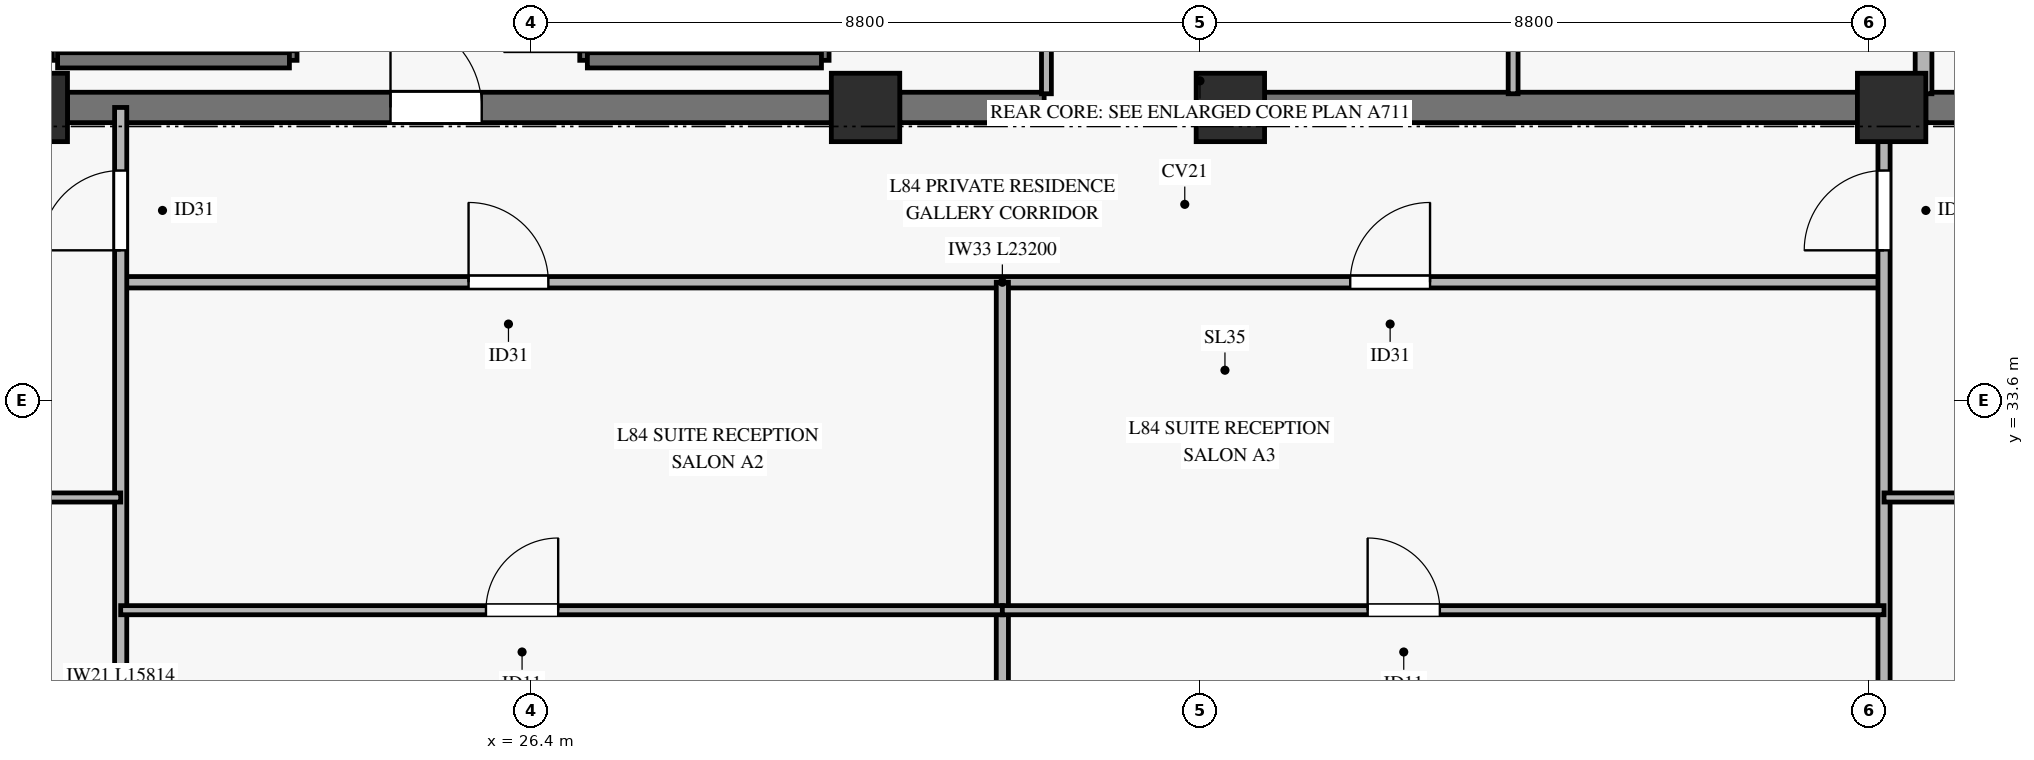
"""IFC4 building model, lengths in metres.
Left out: names, types, materials, properties, quantities, classifications, styles, units other than length and angle.
Written with IfcOpenShell. Run it as: python <this file> out.ifc"""

import sys

from ifc_helpers import new_model, si_unit, direction, frame, frame_2d, origin, origin_2d, place, context, subcontext, project, spatial, rectangle, extrude, source, transform, mapped, element, fill, save


model = new_model("IFC4")
c1 = context("Model", 3, precision=1e-05, world=origin(), true_north=direction((0.0, 1.0)))
c2 = subcontext(c1, "Body", "Model", "MODEL_VIEW")
j1 = project(units=[si_unit("LENGTHUNIT", "METRE"), si_unit("PLANEANGLEUNIT", "RADIAN")], contexts=[c1])
p1 = place(None, origin())
s1 = spatial("IfcSite", under=j1, at=p1, CompositionType="ELEMENT")
p2 = place(p1, origin())
s2 = spatial("IfcBuilding", under=s1, at=p2, CompositionType="ELEMENT")
p3 = place(p2, frame((0.0, 0.0, 324.4)))
s3 = spatial("IfcBuildingStorey", under=s2, at=p3, CompositionType="ELEMENT", Elevation=324.4)
m1 = source(origin(), c2, "Body", "SweptSolid", [
    extrude(rectangle(XDim=0.9, YDim=0.9, at=origin_2d()), origin(), (0.0, 0.0, 1.0), 3.12),
])
for number, where, z_axis, x_axis in (
    (1, (19.85, 37.45, 0.0), (0.0, 0.0, 1.0), (1.0, 0.0, 0.0)),
    (2, (30.8, 37.45, 0.0), (0.0, 0.0, 1.0), (1.0, 0.0, 0.0)),
    (3, (35.6, 37.45, 0.0), (0.0, 0.0, 1.0), (1.0, 0.0, 0.0)),
    (4, (44.3, 37.45, 0.0), (0.0, 0.0, 1.0), (1.0, 0.0, 0.0)),
):
    element("IfcColumn", number, at=place(p3, frame(where, z_axis=z_axis, x_axis=x_axis)), inside=s3, PredefinedType="PILASTER", context=c2, shape_type="MappedRepresentation", body=[
        mapped(m1, transform((0.0, 0.0, 0.0), x_axis=(1.0, 0.0, 0.0), y_axis=(0.0, 1.0, 0.0), z_axis=(0.0, 0.0, 1.0), scale=1.0)),
    ])
p4 = place(p3, frame((20.3, 37.45, 0.0), z_axis=(0.0, 0.0, 1.0), x_axis=(1.0, 0.0, 0.0)))
e5 = element("IfcWall", 5, at=p4, inside=s3, PredefinedType="SHEAR", context=c2, shape_type="SweptSolid", body=[
    extrude(rectangle(XDim=10.05, YDim=0.4, at=frame_2d((5.025, 0.0))), origin(), (0.0, 0.0, 1.0), 3.12),
])
p5 = place(p4, frame((4.25, 0.0, 0.0)))
e6 = element("IfcOpeningElement", 6, at=p5, cuts=e5, PredefinedType="OPENING", context=c2, shape_type="SweptSolid", body=[
    extrude(rectangle(XDim=1.2, YDim=2.15, at=frame_2d((0.6, 1.075))), frame((0.0, 0.21, 0.0), z_axis=(0.0, -1.0, 0.0), x_axis=(1.0, 0.0, 0.0)), (0.0, 0.0, 1.0), 0.42),
])
p6 = place(p3, frame((31.25, 37.45, 0.0), z_axis=(0.0, 0.0, 1.0), x_axis=(1.0, 0.0, 0.0)))
e7 = element("IfcWall", 7, at=p6, inside=s3, PredefinedType="SHEAR", context=c2, shape_type="SweptSolid", body=[
    extrude(rectangle(XDim=1.9, YDim=0.4, at=frame_2d((0.95, 0.0))), origin(), (0.0, 0.0, 1.0), 3.12),
])
p7 = place(p3, frame((36.05, 37.45, 0.0), z_axis=(0.0, 0.0, 1.0), x_axis=(1.0, 0.0, 0.0)))
e8 = element("IfcWall", 8, at=p7, inside=s3, PredefinedType="SHEAR", context=c2, shape_type="SweptSolid", body=[
    extrude(rectangle(XDim=7.8, YDim=0.4, at=frame_2d((3.9, 0.0))), origin(), (0.0, 0.0, 1.0), 3.12),
])
p8 = place(p3, frame((44.75, 37.45, 0.0), z_axis=(0.0, 0.0, 1.0), x_axis=(1.0, 0.0, 0.0)))
e9 = element("IfcWall", 9, at=p8, inside=s3, PredefinedType="SHEAR", context=c2, shape_type="SweptSolid", body=[
    extrude(rectangle(XDim=5.35, YDim=0.4, at=frame_2d((2.675, 0.0))), origin(), (0.0, 0.0, 1.0), 3.12),
])
p9 = place(p8, frame((0.7, 0.0, 0.0)))
e10 = element("IfcOpeningElement", 10, at=p9, cuts=e9, PredefinedType="OPENING", context=c2, shape_type="SweptSolid", body=[
    extrude(rectangle(XDim=1.2, YDim=2.15, at=frame_2d((0.6, 1.075))), frame((0.0, 0.21, 0.0), z_axis=(0.0, -1.0, 0.0), x_axis=(1.0, 0.0, 0.0)), (0.0, 0.0, 1.0), 0.42),
])
p10 = place(p3, frame((20.17, 38.07, 0.0), z_axis=(0.0, 0.0, 1.0), x_axis=(0.0, 1.0, 0.0)))
e11 = element("IfcWall", 11, at=p10, inside=s3, PredefinedType="SOLIDWALL", context=c2, shape_type="SweptSolid", body=[
    extrude(rectangle(XDim=7.25, YDim=0.14, at=frame_2d((3.625, 0.0))), origin(), (0.0, 0.0, 1.0), 3.4),
])
p11 = place(p3, frame((23.22, 38.07, 0.0), z_axis=(0.0, 0.0, 1.0), x_axis=(0.0, 1.0, 0.0)))
e12 = element("IfcWall", 12, at=p11, inside=s3, PredefinedType="SOLIDWALL", context=c2, shape_type="SweptSolid", body=[
    extrude(rectangle(XDim=7.25, YDim=0.2, at=frame_2d((3.625, 0.0))), origin(), (0.0, 0.0, 1.0), 3.4),
])
p12 = place(p11, frame((0.11, 0.0, 0.0)))
e13 = element("IfcOpeningElement", 13, at=p12, cuts=e12, PredefinedType="OPENING", context=c2, shape_type="SweptSolid", body=[
    extrude(rectangle(XDim=1.1, YDim=2.15, at=frame_2d((0.55, 1.075))), frame((0.0, 0.11, 0.0), z_axis=(0.0, -1.0, 0.0), x_axis=(1.0, 0.0, 0.0)), (0.0, 0.0, 1.0), 0.22),
])
p13 = place(p3, frame((20.17, 38.07, 0.0), z_axis=(0.0, 0.0, 1.0), x_axis=(1.0, 0.0, 0.0)))
e14 = element("IfcWall", 14, at=p13, inside=s3, PredefinedType="SOLIDWALL", context=c2, shape_type="SweptSolid", body=[
    extrude(rectangle(XDim=3.05, YDim=0.2, at=frame_2d((1.525, 0.0))), origin(), (0.0, 0.0, 1.0), 3.4),
])
p14 = place(p3, frame((27.14, 38.07, 0.0), z_axis=(0.0, 0.0, 1.0), x_axis=(0.0, 1.0, 0.0)))
e15 = element("IfcWall", 15, at=p14, inside=s3, PredefinedType="SOLIDWALL", context=c2, shape_type="SweptSolid", body=[
    extrude(rectangle(XDim=7.25, YDim=0.2, at=frame_2d((3.625, 0.0))), origin(), (0.0, 0.0, 1.0), 3.4),
])
p15 = place(p14, frame((0.11, 0.0, 0.0)))
e16 = element("IfcOpeningElement", 16, at=p15, cuts=e15, PredefinedType="OPENING", context=c2, shape_type="SweptSolid", body=[
    extrude(rectangle(XDim=1.1, YDim=2.15, at=frame_2d((0.55, 1.075))), frame((0.0, 0.11, 0.0), z_axis=(0.0, -1.0, 0.0), x_axis=(1.0, 0.0, 0.0)), (0.0, 0.0, 1.0), 0.22),
])
p16 = place(p3, frame((30.22, 38.07, 0.0), z_axis=(0.0, 0.0, 1.0), x_axis=(0.0, 1.0, 0.0)))
e17 = element("IfcWall", 17, at=p16, inside=s3, PredefinedType="SOLIDWALL", context=c2, shape_type="SweptSolid", body=[
    extrude(rectangle(XDim=7.25, YDim=0.2, at=frame_2d((3.625, 0.0))), origin(), (0.0, 0.0, 1.0), 3.4),
])
p17 = place(p3, frame((27.14, 38.07, 0.0), z_axis=(0.0, 0.0, 1.0), x_axis=(1.0, 0.0, 0.0)))
e18 = element("IfcWall", 18, at=p17, inside=s3, PredefinedType="SOLIDWALL", context=c2, shape_type="SweptSolid", body=[
    extrude(rectangle(XDim=3.08, YDim=0.2, at=frame_2d((1.54, 0.0))), origin(), (0.0, 0.0, 1.0), 3.4),
])
p18 = place(p3, frame((44.72, 37.63, 0.0), z_axis=(0.0, 0.0, 1.0), x_axis=(0.0, 1.0, 0.0)))
e19 = element("IfcWall", 19, at=p18, inside=s3, PredefinedType="SOLIDWALL", context=c2, shape_type="SweptSolid", body=[
    extrude(rectangle(XDim=7.59, YDim=0.22, at=frame_2d((3.795, 0.0))), origin(), (0.0, 0.0, 1.0), 3.12),
])
p19 = place(p3, frame((33.18, 37.63, 0.0), z_axis=(0.0, 0.0, 1.0), x_axis=(0.0, 1.0, 0.0)))
e20 = element("IfcWall", 20, at=p19, inside=s3, PredefinedType="PARTITIONING", context=c2, shape_type="SweptSolid", body=[
    extrude(rectangle(XDim=6.52, YDim=0.13, at=frame_2d((3.26, 0.0))), origin(), (0.0, 0.0, 1.0), 2.22),
])
p20 = place(p19, frame((1.32, 0.0, 0.0)))
e21 = element("IfcOpeningElement", 21, at=p20, cuts=e20, PredefinedType="OPENING", context=c2, shape_type="SweptSolid", body=[
    extrude(rectangle(XDim=0.9, YDim=2.1, at=frame_2d((0.45, 1.05))), frame((0.0, 0.075, 0.0), z_axis=(0.0, -1.0, 0.0), x_axis=(1.0, 0.0, 0.0)), (0.0, 0.0, 1.0), 0.15),
])
p21 = place(p19, frame((4.62, 0.0, 0.0)))
e22 = element("IfcOpeningElement", 22, at=p21, cuts=e20, PredefinedType="OPENING", context=c2, shape_type="SweptSolid", body=[
    extrude(rectangle(XDim=0.9, YDim=2.1, at=frame_2d((0.45, 1.05))), frame((0.0, 0.075, 0.0), z_axis=(0.0, -1.0, 0.0), x_axis=(1.0, 0.0, 0.0)), (0.0, 0.0, 1.0), 0.15),
])
p22 = place(p3, frame((39.32, 37.63, 0.0), z_axis=(0.0, 0.0, 1.0), x_axis=(0.0, 1.0, 0.0)))
e23 = element("IfcWall", 23, at=p22, inside=s3, PredefinedType="PARTITIONING", context=c2, shape_type="SweptSolid", body=[
    extrude(rectangle(XDim=8.74, YDim=0.13, at=frame_2d((4.37, 0.0))), origin(), (0.0, 0.0, 1.0), 3.12),
])
p23 = place(p22, frame((4.89, 0.0, 0.0)))
e24 = element("IfcOpeningElement", 24, at=p23, cuts=e23, PredefinedType="OPENING", context=c2, shape_type="SweptSolid", body=[
    extrude(rectangle(XDim=0.9, YDim=2.1, at=frame_2d((0.45, 1.05))), frame((0.0, 0.075, 0.0), z_axis=(0.0, -1.0, 0.0), x_axis=(1.0, 0.0, 0.0)), (0.0, 0.0, 1.0), 0.15),
])
p24 = place(p3, frame((21.0, 35.15, 0.0), z_axis=(0.0, 0.0, 1.0), x_axis=(1.0, 0.0, 0.0)))
e25 = element("IfcWall", 25, at=p24, inside=s3, PredefinedType="PARTITIONING", context=c2, shape_type="SweptSolid", body=[
    extrude(rectangle(XDim=23.2, YDim=0.15, at=frame_2d((11.6, 0.0))), origin(), (0.0, 0.0, 1.0), 2.405),
])
p25 = place(p24, frame((4.577, 0.0, 0.0)))
e26 = element("IfcOpeningElement", 26, at=p25, cuts=e25, PredefinedType="OPENING", context=c2, shape_type="SweptSolid", body=[
    extrude(rectangle(XDim=1.05, YDim=2.15, at=frame_2d((0.525, 1.075))), frame((0.0, 0.085, 0.0), z_axis=(0.0, -1.0, 0.0), x_axis=(1.0, 0.0, 0.0)), (0.0, 0.0, 1.0), 0.17),
])
p26 = place(p24, frame((16.177, 0.0, 0.0)))
e27 = element("IfcOpeningElement", 27, at=p26, cuts=e25, PredefinedType="OPENING", context=c2, shape_type="SweptSolid", body=[
    extrude(rectangle(XDim=1.05, YDim=2.15, at=frame_2d((0.525, 1.075))), frame((0.0, 0.085, 0.0), z_axis=(0.0, -1.0, 0.0), x_axis=(1.0, 0.0, 0.0)), (0.0, 0.0, 1.0), 0.17),
])
p27 = place(p3, frame((21.0, 21.636, 0.0), z_axis=(0.0, 0.0, 1.0), x_axis=(0.0, 1.0, 0.0)))
e28 = element("IfcWall", 28, at=p27, inside=s3, PredefinedType="PARTITIONING", context=c2, shape_type="SweptSolid", body=[
    extrude(rectangle(XDim=15.814, YDim=0.16, at=frame_2d((7.907, 0.0))), origin(), (0.0, 0.0, 1.0), 2.705),
])
p28 = place(p27, frame((13.934, 0.0, 0.0)))
e29 = element("IfcOpeningElement", 29, at=p28, cuts=e28, PredefinedType="OPENING", context=c2, shape_type="SweptSolid", body=[
    extrude(rectangle(XDim=1.05, YDim=2.15, at=frame_2d((0.525, 1.075))), frame((0.0, 0.09, 0.0), z_axis=(0.0, -1.0, 0.0), x_axis=(1.0, 0.0, 0.0)), (0.0, 0.0, 1.0), 0.18),
])
p29 = place(p3, frame((32.6, 21.636, 0.0), z_axis=(0.0, 0.0, 1.0), x_axis=(0.0, 1.0, 0.0)))
e30 = element("IfcWall", 30, at=p29, inside=s3, PredefinedType="PARTITIONING", context=c2, shape_type="SweptSolid", body=[
    extrude(rectangle(XDim=13.514, YDim=0.16, at=frame_2d((6.757, 0.0))), origin(), (0.0, 0.0, 1.0), 2.705),
])
p30 = place(p3, frame((44.2, 21.636, 0.0), z_axis=(0.0, 0.0, 1.0), x_axis=(0.0, 1.0, 0.0)))
e31 = element("IfcWall", 31, at=p30, inside=s3, PredefinedType="PARTITIONING", context=c2, shape_type="SweptSolid", body=[
    extrude(rectangle(XDim=15.814, YDim=0.16, at=frame_2d((7.907, 0.0))), origin(), (0.0, 0.0, 1.0), 2.405),
])
p31 = place(p30, frame((13.934, 0.0, 0.0)))
e32 = element("IfcOpeningElement", 32, at=p31, cuts=e31, PredefinedType="OPENING", context=c2, shape_type="SweptSolid", body=[
    extrude(rectangle(XDim=1.05, YDim=2.15, at=frame_2d((0.525, 1.075))), frame((0.0, 0.09, 0.0), z_axis=(0.0, -1.0, 0.0), x_axis=(1.0, 0.0, 0.0)), (0.0, 0.0, 1.0), 0.18),
])
p32 = place(p3, frame((11.27, 32.318, 0.0), z_axis=(0.0, 0.0, 1.0), x_axis=(1.0, 0.0, 0.0)))
e33 = element("IfcWall", 33, at=p32, inside=s3, PredefinedType="PARTITIONING", context=c2, shape_type="SweptSolid", body=[
    extrude(rectangle(XDim=9.73, YDim=0.12, at=frame_2d((4.865, 0.0))), origin(), (0.0, 0.0, 1.0), 2.405),
])
p33 = place(p32, frame((4.178, 0.0, 0.0)))
e34 = element("IfcOpeningElement", 34, at=p33, cuts=e33, PredefinedType="OPENING", context=c2, shape_type="SweptSolid", body=[
    extrude(rectangle(XDim=0.95, YDim=2.1, at=frame_2d((0.475, 1.05))), frame((0.0, 0.07, 0.0), z_axis=(0.0, -1.0, 0.0), x_axis=(1.0, 0.0, 0.0)), (0.0, 0.0, 1.0), 0.14),
])
p34 = place(p3, frame((21.0, 30.835, 0.0), z_axis=(0.0, 0.0, 1.0), x_axis=(1.0, 0.0, 0.0)))
e35 = element("IfcWall", 35, at=p34, inside=s3, PredefinedType="PARTITIONING", context=c2, shape_type="SweptSolid", body=[
    extrude(rectangle(XDim=11.6, YDim=0.12, at=frame_2d((5.8, 0.0))), origin(), (0.0, 0.0, 1.0), 2.405),
])
p35 = place(p34, frame((4.806, 0.0, 0.0)))
e36 = element("IfcOpeningElement", 36, at=p35, cuts=e35, PredefinedType="OPENING", context=c2, shape_type="SweptSolid", body=[
    extrude(rectangle(XDim=0.95, YDim=2.1, at=frame_2d((0.475, 1.05))), frame((0.0, 0.07, 0.0), z_axis=(0.0, -1.0, 0.0), x_axis=(1.0, 0.0, 0.0)), (0.0, 0.0, 1.0), 0.14),
])
p36 = place(p3, frame((32.6, 30.835, 0.0), z_axis=(0.0, 0.0, 1.0), x_axis=(1.0, 0.0, 0.0)))
e37 = element("IfcWall", 37, at=p36, inside=s3, PredefinedType="PARTITIONING", context=c2, shape_type="SweptSolid", body=[
    extrude(rectangle(XDim=11.6, YDim=0.12, at=frame_2d((5.8, 0.0))), origin(), (0.0, 0.0, 1.0), 2.405),
])
p37 = place(p36, frame((4.806, 0.0, 0.0)))
e38 = element("IfcOpeningElement", 38, at=p37, cuts=e37, PredefinedType="OPENING", context=c2, shape_type="SweptSolid", body=[
    extrude(rectangle(XDim=0.95, YDim=2.1, at=frame_2d((0.475, 1.05))), frame((0.0, 0.07, 0.0), z_axis=(0.0, -1.0, 0.0), x_axis=(1.0, 0.0, 0.0)), (0.0, 0.0, 1.0), 0.14),
])
p38 = place(p3, frame((44.2, 32.318, 0.0), z_axis=(0.0, 0.0, 1.0), x_axis=(1.0, 0.0, 0.0)))
e39 = element("IfcWall", 39, at=p38, inside=s3, PredefinedType="PARTITIONING", context=c2, shape_type="SweptSolid", body=[
    extrude(rectangle(XDim=14.931, YDim=0.12, at=frame_2d((7.466, 0.0))), origin(), (0.0, 0.0, 1.0), 2.405),
])
p39 = place(p38, frame((6.058, 0.0, 0.0)))
e40 = element("IfcOpeningElement", 40, at=p39, cuts=e39, PredefinedType="OPENING", context=c2, shape_type="SweptSolid", body=[
    extrude(rectangle(XDim=0.95, YDim=2.1, at=frame_2d((0.475, 1.05))), frame((0.0, 0.07, 0.0), z_axis=(0.0, -1.0, 0.0), x_axis=(1.0, 0.0, 0.0)), (0.0, 0.0, 1.0), 0.14),
])
m2 = source(origin(), c2, "Body", "SweptSolid", [
    extrude(rectangle(XDim=1.2, YDim=2.15, at=frame_2d((0.6, 1.075))), frame((0.0, 0.025, 0.0), z_axis=(0.0, -1.0, 0.0), x_axis=(1.0, 0.0, 0.0)), (0.0, 0.0, 1.0), 0.05),
])
p40 = place(p5, origin())
e41 = element("IfcDoor", 41, at=p40, inside=s3, OperationType="SINGLE_SWING_LEFT", PredefinedType="DOOR", context=c2, shape_type="MappedRepresentation", body=[
    mapped(m2, transform((0.0, 0.0, 0.0), x_axis=(1.0, 0.0, 0.0), y_axis=(0.0, 1.0, 0.0), z_axis=(0.0, 0.0, 1.0), scale=1.0)),
])
fill(e6, e41)
m3 = source(origin(), c2, "Body", "SweptSolid", [
    extrude(rectangle(XDim=1.05, YDim=2.15, at=frame_2d((0.525, 1.075))), frame((0.0, 0.025, 0.0), z_axis=(0.0, -1.0, 0.0), x_axis=(1.0, 0.0, 0.0)), (0.0, 0.0, 1.0), 0.05),
])
p41 = place(p28, origin())
e42 = element("IfcDoor", 42, at=p41, inside=s3, OperationType="SINGLE_SWING_LEFT", PredefinedType="DOOR", context=c2, shape_type="MappedRepresentation", body=[
    mapped(m3, transform((0.0, 0.0, 0.0), x_axis=(1.0, 0.0, 0.0), y_axis=(0.0, 1.0, 0.0), z_axis=(0.0, 0.0, 1.0), scale=1.0)),
])
fill(e29, e42)
p42 = place(p25, origin())
e43 = element("IfcDoor", 43, at=p42, inside=s3, OperationType="SINGLE_SWING_LEFT", PredefinedType="DOOR", context=c2, shape_type="MappedRepresentation", body=[
    mapped(m3, transform((0.0, 0.0, 0.0), x_axis=(1.0, 0.0, 0.0), y_axis=(0.0, 1.0, 0.0), z_axis=(0.0, 0.0, 1.0), scale=1.0)),
])
fill(e26, e43)
m4 = source(origin(), c2, "Body", "SweptSolid", [
    extrude(rectangle(XDim=0.95, YDim=2.1, at=frame_2d((0.475, 1.05))), frame((0.0, 0.025, 0.0), z_axis=(0.0, -1.0, 0.0), x_axis=(1.0, 0.0, 0.0)), (0.0, 0.0, 1.0), 0.05),
])
p43 = place(p35, origin())
e44 = element("IfcDoor", 44, at=p43, inside=s3, OperationType="SINGLE_SWING_RIGHT", PredefinedType="DOOR", context=c2, shape_type="MappedRepresentation", body=[
    mapped(m4, transform((0.0, 0.0, 0.0), x_axis=(1.0, 0.0, 0.0), y_axis=(0.0, 1.0, 0.0), z_axis=(0.0, 0.0, 1.0), scale=1.0)),
])
fill(e36, e44)
p44 = place(p26, origin())
e45 = element("IfcDoor", 45, at=p44, inside=s3, OperationType="SINGLE_SWING_RIGHT", PredefinedType="DOOR", context=c2, shape_type="MappedRepresentation", body=[
    mapped(m3, transform((0.0, 0.0, 0.0), x_axis=(1.0, 0.0, 0.0), y_axis=(0.0, 1.0, 0.0), z_axis=(0.0, 0.0, 1.0), scale=1.0)),
])
fill(e27, e45)
p45 = place(p37, origin())
e46 = element("IfcDoor", 46, at=p45, inside=s3, OperationType="SINGLE_SWING_LEFT", PredefinedType="DOOR", context=c2, shape_type="MappedRepresentation", body=[
    mapped(m4, transform((0.0, 0.0, 0.0), x_axis=(1.0, 0.0, 0.0), y_axis=(0.0, 1.0, 0.0), z_axis=(0.0, 0.0, 1.0), scale=1.0)),
])
fill(e38, e46)
p46 = place(p31, origin())
e47 = element("IfcDoor", 47, at=p46, inside=s3, OperationType="SINGLE_SWING_LEFT", PredefinedType="DOOR", context=c2, shape_type="MappedRepresentation", body=[
    mapped(m3, transform((0.0, 0.0, 0.0), x_axis=(1.0, 0.0, 0.0), y_axis=(0.0, 1.0, 0.0), z_axis=(0.0, 0.0, 1.0), scale=1.0)),
])
fill(e32, e47)
save(model, sys.argv[1])
